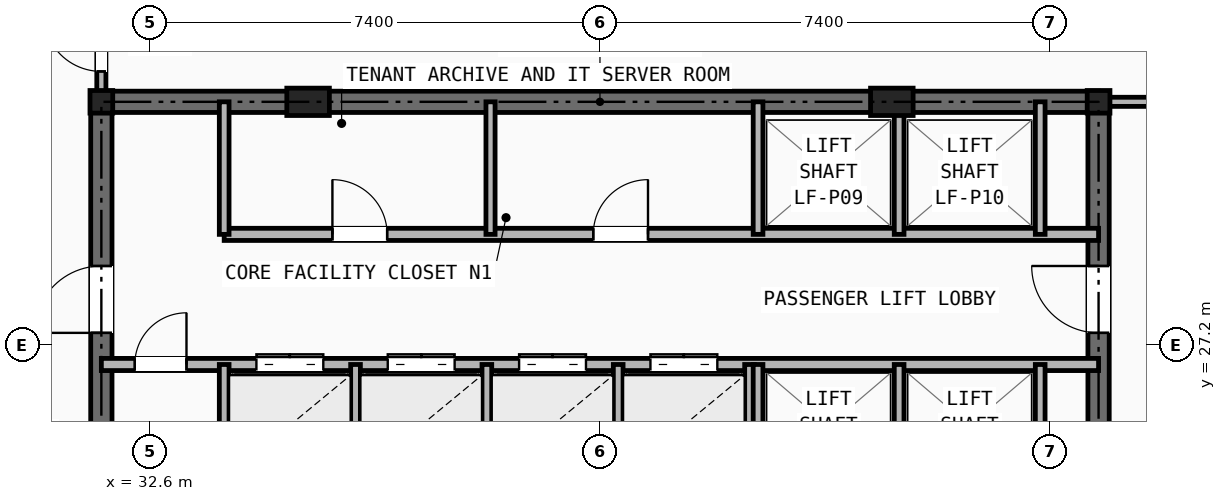
"""IFC4 building model, lengths in metres.
Left out: names, types, materials, properties, quantities, classifications, styles, units other than length and angle.
Written with IfcOpenShell. Run it as: python <this file> out.ifc"""

import sys

from ifc_helpers import new_model, si_unit, direction, frame, frame_2d, origin, origin_2d, place, context, subcontext, project, spatial, rectangle, i_section, extrude, element, fill, save


model = new_model("IFC4")
c1 = context("Model", 3, precision=1e-05, world=origin(), true_north=direction((0.0, 1.0)))
c2 = subcontext(c1, "Body", "Model", "MODEL_VIEW")
j1 = project(units=[si_unit("LENGTHUNIT", "METRE"), si_unit("PLANEANGLEUNIT", "RADIAN")], contexts=[c1])
p1 = place(None, origin())
s1 = spatial("IfcSite", under=j1, at=p1, CompositionType="ELEMENT")
p2 = place(p1, origin())
s2 = spatial("IfcBuilding", under=s1, at=p2, CompositionType="ELEMENT")
p3 = place(p2, frame((0.0, 0.0, 140.15)))
s3 = spatial("IfcBuildingStorey", under=s2, at=p3, CompositionType="ELEMENT", Elevation=140.15)
for number, where, z_axis, x_axis in (
    (1, (31.8, 31.2, 0.0), (0.0, 0.0, 1.0), (1.0, 0.0, 0.0)),
    (2, (48.2, 31.2, 0.0), (0.0, 0.0, 1.0), (1.0, 0.0, 0.0)),
):
    element("IfcColumn", number, at=place(p3, frame(where, z_axis=z_axis, x_axis=x_axis)), inside=s3, PredefinedType="COLUMN", context=c2, shape_type="SweptSolid", body=[
        extrude(i_section(OverallWidth=0.374, OverallDepth=0.372, WebThickness=0.016, FlangeThickness=0.026, at=origin_2d()), origin(), (0.0, 0.0, 1.0), 3.45),
    ])
for number, where, z_axis, x_axis in (
    (3, (35.2, 31.2, 0.0), (0.0, 0.0, 1.0), (1.0, 0.0, 0.0)),
    (4, (44.8, 31.2, 0.0), (0.0, 0.0, 1.0), (1.0, 0.0, 0.0)),
):
    element("IfcColumn", number, at=place(p3, frame(where, z_axis=z_axis, x_axis=x_axis)), inside=s3, PredefinedType="PILASTER", context=c2, shape_type="SweptSolid", body=[
        extrude(rectangle(XDim=0.7, YDim=0.45, at=origin_2d()), origin(), (0.0, 0.0, 1.0), 3.45),
    ])
p4 = place(p3, frame((31.8, 31.2, 0.0), z_axis=(0.0, 0.0, 1.0), x_axis=(1.0, 0.0, 0.0)))
e5 = element("IfcWall", 5, at=p4, inside=s3, PredefinedType="SHEAR", context=c2, shape_type="SweptSolid", body=[
    extrude(rectangle(XDim=16.4, YDim=0.35, at=frame_2d((8.2, 0.0))), origin(), (0.0, 0.0, 1.0), 3.21),
])
p5 = place(p3, frame((31.8, 16.4, 0.0), z_axis=(0.0, 0.0, 1.0), x_axis=(0.0, 1.0, 0.0)))
e6 = element("IfcWall", 6, at=p5, inside=s3, PredefinedType="SHEAR", context=c2, shape_type="SweptSolid", body=[
    extrude(rectangle(XDim=14.8, YDim=0.35, at=frame_2d((7.4, 0.0))), origin(), (0.0, 0.0, 1.0), 3.21),
])
p6 = place(p5, frame((11.0, 0.0, 0.0)))
e7 = element("IfcOpeningElement", 7, at=p6, cuts=e6, PredefinedType="OPENING", context=c2, shape_type="SweptSolid", body=[
    extrude(rectangle(XDim=1.1, YDim=2.15, at=frame_2d((0.55, 1.075))), frame((0.0, 0.185, 0.0), z_axis=(0.0, -1.0, 0.0), x_axis=(1.0, 0.0, 0.0)), (0.0, 0.0, 1.0), 0.37),
])
p7 = place(p3, frame((48.2, 16.4, 0.0), z_axis=(0.0, 0.0, 1.0), x_axis=(0.0, 1.0, 0.0)))
e8 = element("IfcWall", 8, at=p7, inside=s3, PredefinedType="SHEAR", context=c2, shape_type="SweptSolid", body=[
    extrude(rectangle(XDim=14.8, YDim=0.35, at=frame_2d((7.4, 0.0))), origin(), (0.0, 0.0, 1.0), 3.21),
])
p8 = place(p7, frame((11.0, 0.0, 0.0)))
e9 = element("IfcOpeningElement", 9, at=p8, cuts=e8, PredefinedType="OPENING", context=c2, shape_type="SweptSolid", body=[
    extrude(rectangle(XDim=1.1, YDim=2.15, at=frame_2d((0.55, 1.075))), frame((0.0, 0.185, 0.0), z_axis=(0.0, -1.0, 0.0), x_axis=(1.0, 0.0, 0.0)), (0.0, 0.0, 1.0), 0.37),
])
p9 = place(p3, frame((33.82, 29.02, 0.0), z_axis=(0.0, 0.0, 1.0), x_axis=(1.0, 0.0, 0.0)))
e10 = element("IfcWall", 10, at=p9, inside=s3, PredefinedType="SOLIDWALL", context=c2, shape_type="SweptSolid", body=[
    extrude(rectangle(XDim=14.38, YDim=0.2, at=frame_2d((7.19, 0.0))), origin(), (0.0, 0.0, 1.0), 2.661),
])
p10 = place(p9, frame((1.78, 0.0, 0.0)))
e11 = element("IfcOpeningElement", 11, at=p10, cuts=e10, PredefinedType="OPENING", context=c2, shape_type="SweptSolid", body=[
    extrude(rectangle(XDim=0.9, YDim=2.1, at=frame_2d((0.45, 1.05))), frame((0.0, 0.11, 0.0), z_axis=(0.0, -1.0, 0.0), x_axis=(1.0, 0.0, 0.0)), (0.0, 0.0, 1.0), 0.22),
])
p11 = place(p9, frame((6.07, 0.0, 0.0)))
e12 = element("IfcOpeningElement", 12, at=p11, cuts=e10, PredefinedType="OPENING", context=c2, shape_type="SweptSolid", body=[
    extrude(rectangle(XDim=0.9, YDim=2.1, at=frame_2d((0.45, 1.05))), frame((0.0, 0.11, 0.0), z_axis=(0.0, -1.0, 0.0), x_axis=(1.0, 0.0, 0.0)), (0.0, 0.0, 1.0), 0.22),
])
p12 = place(p3, frame((31.8, 26.88, 0.0), z_axis=(0.0, 0.0, 1.0), x_axis=(1.0, 0.0, 0.0)))
e13 = element("IfcWall", 13, at=p12, inside=s3, PredefinedType="SOLIDWALL", context=c2, shape_type="SweptSolid", body=[
    extrude(rectangle(XDim=16.4, YDim=0.2, at=frame_2d((8.2, 0.0))), origin(), (0.0, 0.0, 1.0), 2.661),
])
p13 = place(p12, frame((0.55, 0.0, 0.0)))
e14 = element("IfcOpeningElement", 14, at=p13, cuts=e13, PredefinedType="OPENING", context=c2, shape_type="SweptSolid", body=[
    extrude(rectangle(XDim=0.85, YDim=2.05, at=frame_2d((0.425, 1.025))), frame((0.0, 0.11, 0.0), z_axis=(0.0, -1.0, 0.0), x_axis=(1.0, 0.0, 0.0)), (0.0, 0.0, 1.0), 0.22),
])
p14 = place(p12, frame((2.55, 0.0, 0.0)))
e15 = element("IfcOpeningElement", 15, at=p14, cuts=e13, PredefinedType="OPENING", context=c2, shape_type="SweptSolid", body=[
    extrude(rectangle(XDim=1.1, YDim=2.15, at=frame_2d((0.55, 1.075))), frame((0.0, 0.11, 0.0), z_axis=(0.0, -1.0, 0.0), x_axis=(1.0, 0.0, 0.0)), (0.0, 0.0, 1.0), 0.22),
])
p15 = place(p12, frame((4.71, 0.0, 0.0)))
e16 = element("IfcOpeningElement", 16, at=p15, cuts=e13, PredefinedType="OPENING", context=c2, shape_type="SweptSolid", body=[
    extrude(rectangle(XDim=1.1, YDim=2.15, at=frame_2d((0.55, 1.075))), frame((0.0, 0.11, 0.0), z_axis=(0.0, -1.0, 0.0), x_axis=(1.0, 0.0, 0.0)), (0.0, 0.0, 1.0), 0.22),
])
p16 = place(p12, frame((6.87, 0.0, 0.0)))
e17 = element("IfcOpeningElement", 17, at=p16, cuts=e13, PredefinedType="OPENING", context=c2, shape_type="SweptSolid", body=[
    extrude(rectangle(XDim=1.1, YDim=2.15, at=frame_2d((0.55, 1.075))), frame((0.0, 0.11, 0.0), z_axis=(0.0, -1.0, 0.0), x_axis=(1.0, 0.0, 0.0)), (0.0, 0.0, 1.0), 0.22),
])
p17 = place(p12, frame((9.03, 0.0, 0.0)))
e18 = element("IfcOpeningElement", 18, at=p17, cuts=e13, PredefinedType="OPENING", context=c2, shape_type="SweptSolid", body=[
    extrude(rectangle(XDim=1.1, YDim=2.15, at=frame_2d((0.55, 1.075))), frame((0.0, 0.11, 0.0), z_axis=(0.0, -1.0, 0.0), x_axis=(1.0, 0.0, 0.0)), (0.0, 0.0, 1.0), 0.22),
])
p18 = place(p3, frame((33.82, 29.02, 0.0), z_axis=(0.0, 0.0, 1.0), x_axis=(0.0, 1.0, 0.0)))
e19 = element("IfcWall", 19, at=p18, inside=s3, PredefinedType="SOLIDWALL", context=c2, shape_type="SweptSolid", body=[
    extrude(rectangle(XDim=2.18, YDim=0.16, at=frame_2d((1.09, 0.0))), origin(), (0.0, 0.0, 1.0), 2.938),
])
p19 = place(p3, frame((33.82, 24.8, 0.0), z_axis=(0.0, 0.0, 1.0), x_axis=(0.0, 1.0, 0.0)))
e20 = element("IfcWall", 20, at=p19, inside=s3, PredefinedType="SOLIDWALL", context=c2, shape_type="SweptSolid", body=[
    extrude(rectangle(XDim=2.08, YDim=0.16, at=frame_2d((1.04, 0.0))), origin(), (0.0, 0.0, 1.0), 3.21),
])
p20 = place(p3, frame((38.2, 29.02, 0.0), z_axis=(0.0, 0.0, 1.0), x_axis=(0.0, 1.0, 0.0)))
e21 = element("IfcWall", 21, at=p20, inside=s3, PredefinedType="PARTITIONING", context=c2, shape_type="SweptSolid", body=[
    extrude(rectangle(XDim=2.18, YDim=0.15, at=frame_2d((1.09, 0.0))), origin(), (0.0, 0.0, 1.0), 2.938),
])
for number, where, z_axis, x_axis in (
    (22, (35.98, 24.8, 0.0), (0.0, 0.0, 1.0), (0.0, 1.0, 0.0)),
    (23, (38.14, 24.8, 0.0), (0.0, 0.0, 1.0), (0.0, 1.0, 0.0)),
    (24, (40.3, 24.8, 0.0), (0.0, 0.0, 1.0), (0.0, 1.0, 0.0)),
    (25, (42.46, 24.8, 0.0), (0.0, 0.0, 1.0), (0.0, 1.0, 0.0)),
):
    element("IfcWall", number, at=place(p3, frame(where, z_axis=z_axis, x_axis=x_axis)), inside=s3, PredefinedType="SOLIDWALL", context=c2, shape_type="SweptSolid", body=[
        extrude(rectangle(XDim=2.08, YDim=0.16, at=frame_2d((1.04, 0.0))), origin(), (0.0, 0.0, 1.0), 3.21),
    ])
for number, where, z_axis, x_axis in (
    (26, (42.6, 29.02, 0.0), (0.0, 0.0, 1.0), (0.0, 1.0, 0.0)),
    (27, (44.92, 29.02, 0.0), (0.0, 0.0, 1.0), (0.0, 1.0, 0.0)),
    (28, (47.24, 29.02, 0.0), (0.0, 0.0, 1.0), (0.0, 1.0, 0.0)),
):
    element("IfcWall", number, at=place(p3, frame(where, z_axis=z_axis, x_axis=x_axis)), inside=s3, PredefinedType="SOLIDWALL", context=c2, shape_type="SweptSolid", body=[
        extrude(rectangle(XDim=2.18, YDim=0.16, at=frame_2d((1.09, 0.0))), origin(), (0.0, 0.0, 1.0), 2.938),
    ])
for number, where, z_axis, x_axis in (
    (29, (42.6, 24.8, 0.0), (0.0, 0.0, 1.0), (0.0, 1.0, 0.0)),
    (30, (44.92, 24.8, 0.0), (0.0, 0.0, 1.0), (0.0, 1.0, 0.0)),
    (31, (47.24, 24.8, 0.0), (0.0, 0.0, 1.0), (0.0, 1.0, 0.0)),
):
    element("IfcWall", number, at=place(p3, frame(where, z_axis=z_axis, x_axis=x_axis)), inside=s3, PredefinedType="SOLIDWALL", context=c2, shape_type="SweptSolid", body=[
        extrude(rectangle(XDim=2.08, YDim=0.16, at=frame_2d((1.04, 0.0))), origin(), (0.0, 0.0, 1.0), 3.21),
    ])
p21 = place(p3, frame((31.8, 31.2, 0.0), z_axis=(0.0, 0.0, 1.0), x_axis=(0.0, 1.0, 0.0)))
e32 = element("IfcWall", 32, at=p21, inside=s3, PredefinedType="PARTITIONING", context=c2, shape_type="SweptSolid", body=[
    extrude(rectangle(XDim=5.3, YDim=0.15, at=frame_2d((2.65, 0.0))), origin(), (0.0, 0.0, 1.0), 2.252),
])
p22 = place(p21, frame((0.5, 0.0, 0.0)))
e33 = element("IfcOpeningElement", 33, at=p22, cuts=e32, PredefinedType="OPENING", context=c2, shape_type="SweptSolid", body=[
    extrude(rectangle(XDim=0.95, YDim=2.1, at=frame_2d((0.475, 1.05))), frame((0.0, 0.085, 0.0), z_axis=(0.0, -1.0, 0.0), x_axis=(1.0, 0.0, 0.0)), (0.0, 0.0, 1.0), 0.17),
])
p23 = place(p3, frame((48.2, 31.2, 0.0), z_axis=(0.0, 0.0, 1.0), x_axis=(1.0, 0.0, 0.0)))
e34 = element("IfcWall", 34, at=p23, inside=s3, PredefinedType="PARTITIONING", context=c2, shape_type="SweptSolid", body=[
    extrude(rectangle(XDim=8.332, YDim=0.15, at=frame_2d((4.166, 0.0))), origin(), (0.0, 0.0, 1.0), 2.252),
])
p24 = place(p13, origin())
e35 = element("IfcDoor", 35, at=p24, inside=s3, OperationType="SINGLE_SWING_RIGHT", PredefinedType="DOOR", context=c2, shape_type="SweptSolid", body=[
    extrude(rectangle(XDim=0.85, YDim=2.05, at=frame_2d((0.425, 1.025))), frame((0.0, 0.025, 0.0), z_axis=(0.0, -1.0, 0.0), x_axis=(1.0, 0.0, 0.0)), (0.0, 0.0, 1.0), 0.05),
])
fill(e14, e35)
p25 = place(p6, origin())
e36 = element("IfcDoor", 36, at=p25, inside=s3, OperationType="SINGLE_SWING_LEFT", PredefinedType="DOOR", context=c2, shape_type="SweptSolid", body=[
    extrude(rectangle(XDim=1.1, YDim=2.15, at=frame_2d((0.55, 1.075))), frame((0.0, 0.025, 0.0), z_axis=(0.0, -1.0, 0.0), x_axis=(1.0, 0.0, 0.0)), (0.0, 0.0, 1.0), 0.05),
])
fill(e7, e36)
p26 = place(p8, origin())
e37 = element("IfcDoor", 37, at=p26, inside=s3, OperationType="SINGLE_SWING_RIGHT", PredefinedType="DOOR", context=c2, shape_type="SweptSolid", body=[
    extrude(rectangle(XDim=1.1, YDim=2.15, at=frame_2d((0.55, 1.075))), frame((0.0, 0.025, 0.0), z_axis=(0.0, -1.0, 0.0), x_axis=(1.0, 0.0, 0.0)), (0.0, 0.0, 1.0), 0.05),
])
fill(e9, e37)
p27 = place(p10, origin())
e38 = element("IfcDoor", 38, at=p27, inside=s3, OperationType="SINGLE_SWING_LEFT", PredefinedType="DOOR", context=c2, shape_type="SweptSolid", body=[
    extrude(rectangle(XDim=0.9, YDim=2.1, at=frame_2d((0.45, 1.05))), frame((0.0, 0.025, 0.0), z_axis=(0.0, -1.0, 0.0), x_axis=(1.0, 0.0, 0.0)), (0.0, 0.0, 1.0), 0.05),
])
fill(e11, e38)
p28 = place(p11, origin())
e39 = element("IfcDoor", 39, at=p28, inside=s3, OperationType="SINGLE_SWING_RIGHT", PredefinedType="DOOR", context=c2, shape_type="SweptSolid", body=[
    extrude(rectangle(XDim=0.9, YDim=2.1, at=frame_2d((0.45, 1.05))), frame((0.0, 0.025, 0.0), z_axis=(0.0, -1.0, 0.0), x_axis=(1.0, 0.0, 0.0)), (0.0, 0.0, 1.0), 0.05),
])
fill(e12, e39)
p29 = place(p14, origin())
e40 = element("IfcDoor", 40, at=p29, inside=s3, OperationType="DOUBLE_DOOR_SLIDING", PredefinedType="DOOR", context=c2, shape_type="SweptSolid", body=[
    extrude(rectangle(XDim=1.1, YDim=2.15, at=frame_2d((0.55, 1.075))), frame((0.0, 0.025, 0.0), z_axis=(0.0, -1.0, 0.0), x_axis=(1.0, 0.0, 0.0)), (0.0, 0.0, 1.0), 0.05),
])
fill(e15, e40)
p30 = place(p15, origin())
e41 = element("IfcDoor", 41, at=p30, inside=s3, OperationType="DOUBLE_DOOR_SLIDING", PredefinedType="DOOR", context=c2, shape_type="SweptSolid", body=[
    extrude(rectangle(XDim=1.1, YDim=2.15, at=frame_2d((0.55, 1.075))), frame((0.0, 0.025, 0.0), z_axis=(0.0, -1.0, 0.0), x_axis=(1.0, 0.0, 0.0)), (0.0, 0.0, 1.0), 0.05),
])
fill(e16, e41)
p31 = place(p16, origin())
e42 = element("IfcDoor", 42, at=p31, inside=s3, OperationType="DOUBLE_DOOR_SLIDING", PredefinedType="DOOR", context=c2, shape_type="SweptSolid", body=[
    extrude(rectangle(XDim=1.1, YDim=2.15, at=frame_2d((0.55, 1.075))), frame((0.0, 0.025, 0.0), z_axis=(0.0, -1.0, 0.0), x_axis=(1.0, 0.0, 0.0)), (0.0, 0.0, 1.0), 0.05),
])
fill(e17, e42)
p32 = place(p17, origin())
e43 = element("IfcDoor", 43, at=p32, inside=s3, OperationType="DOUBLE_DOOR_SLIDING", PredefinedType="DOOR", context=c2, shape_type="SweptSolid", body=[
    extrude(rectangle(XDim=1.1, YDim=2.15, at=frame_2d((0.55, 1.075))), frame((0.0, 0.025, 0.0), z_axis=(0.0, -1.0, 0.0), x_axis=(1.0, 0.0, 0.0)), (0.0, 0.0, 1.0), 0.05),
])
fill(e18, e43)
p33 = place(p22, origin())
e44 = element("IfcDoor", 44, at=p33, inside=s3, OperationType="SINGLE_SWING_RIGHT", PredefinedType="DOOR", context=c2, shape_type="SweptSolid", body=[
    extrude(rectangle(XDim=0.95, YDim=2.1, at=frame_2d((0.475, 1.05))), frame((0.0, 0.025, 0.0), z_axis=(0.0, -1.0, 0.0), x_axis=(1.0, 0.0, 0.0)), (0.0, 0.0, 1.0), 0.05),
])
fill(e33, e44)
save(model, sys.argv[1])
